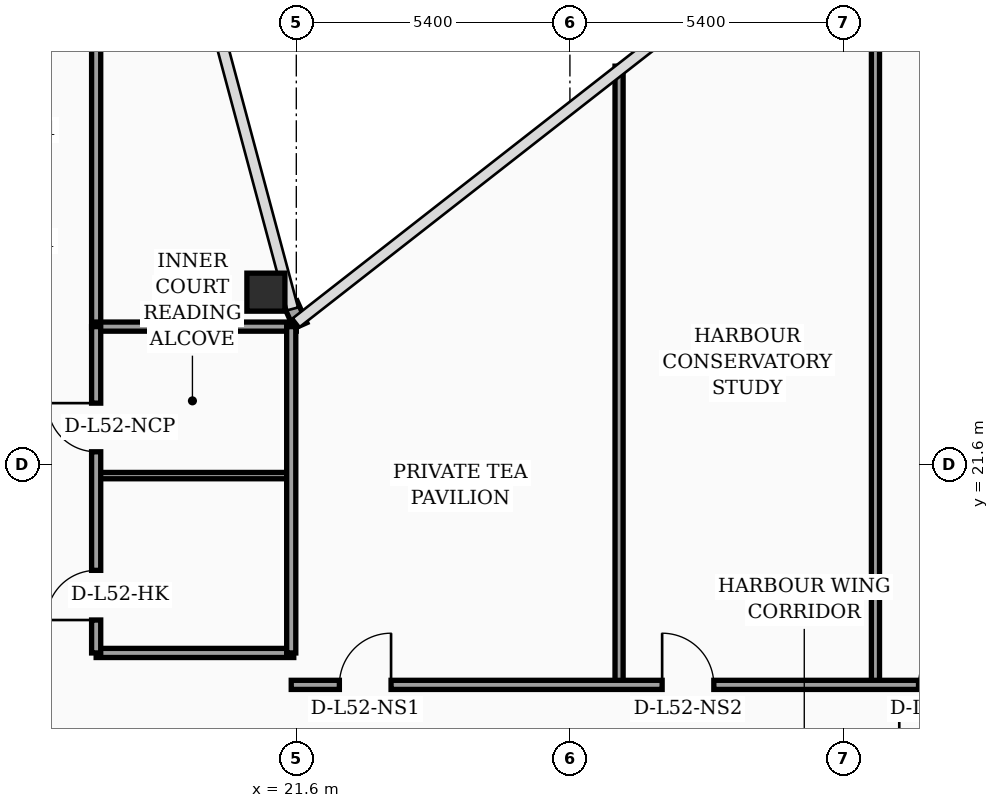
"""IFC4 building model, lengths in metres.
Left out: names, types, materials, properties, quantities, classifications, styles, units other than length and angle.
Written with IfcOpenShell. Run it as: python <this file> out.ifc"""

import sys

from ifc_helpers import new_model, si_unit, direction, frame, frame_2d, origin, origin_2d, place, context, subcontext, project, spatial, rectangle, hollow_rectangle, extrude, element, fill, save


model = new_model("IFC4")
c1 = context("Model", 3, precision=1e-05, world=origin(), true_north=direction((0.0, 1.0)))
c2 = subcontext(c1, "Body", "Model", "MODEL_VIEW")
j1 = project(units=[si_unit("LENGTHUNIT", "METRE"), si_unit("PLANEANGLEUNIT", "RADIAN")], contexts=[c1])
p1 = place(None, origin())
s1 = spatial("IfcSite", under=j1, at=p1, CompositionType="ELEMENT")
p2 = place(p1, origin())
s2 = spatial("IfcBuilding", under=s1, at=p2, CompositionType="ELEMENT")
p3 = place(p2, frame((0.0, 0.0, 211.0)))
s3 = spatial("IfcBuildingStorey", under=s2, at=p3, CompositionType="ELEMENT", Elevation=211.0)
p4 = place(p3, frame((21.0, 25.0, 0.0), z_axis=(0.0, 0.0, 1.0), x_axis=(1.0, 0.0, 0.0)))
e1 = element("IfcColumn", 1, at=p4, inside=s3, PredefinedType="COLUMN", context=c2, shape_type="SweptSolid", body=[
    extrude(hollow_rectangle(XDim=0.75, YDim=0.75, WallThickness=0.032, at=origin_2d()), origin(), (0.0, 0.0, 1.0), 3.56),
])
p5 = place(p3, frame((21.68, 24.34, 0.0), z_axis=(0.0, 0.0, 1.0), x_axis=(-0.40758134973, 0.913168901875, 0.0)))
e2 = element("IfcWall", 2, at=p5, inside=s3, PredefinedType="SOLIDWALL", context=c2, shape_type="SweptSolid", body=[
    extrude(rectangle(XDim=0.471, YDim=0.28, at=frame_2d((0.235, 0.0))), origin(), (0.0, 0.0, 1.0), 3.56),
])
p6 = place(p3, frame((17.65, 24.3, 0.0), z_axis=(0.0, 0.0, 1.0), x_axis=(0.0, 1.0, 0.0)))
e3 = element("IfcWall", 3, at=p6, inside=s3, PredefinedType="PARTITIONING", context=c2, shape_type="SweptSolid", body=[
    extrude(rectangle(XDim=18.15, YDim=0.18, at=frame_2d((9.075, 0.0))), origin(), (0.0, 0.0, 1.0), 2.94),
])
p7 = place(p3, frame((17.65, 17.88, 0.0), z_axis=(0.0, 0.0, 1.0), x_axis=(1.0, 0.0, 0.0)))
e4 = element("IfcWall", 4, at=p7, inside=s3, PredefinedType="PARTITIONING", context=c2, shape_type="SweptSolid", body=[
    extrude(rectangle(XDim=3.9, YDim=0.18, at=frame_2d((1.95, 0.0))), origin(), (0.0, 0.0, 1.0), 3.56),
])
p8 = place(p3, frame((17.65, 21.38, 0.0), z_axis=(0.0, 0.0, 1.0), x_axis=(1.0, 0.0, 0.0)))
e5 = element("IfcWall", 5, at=p8, inside=s3, PredefinedType="PARTITIONING", context=c2, shape_type="SweptSolid", body=[
    extrude(rectangle(XDim=3.9, YDim=0.125, at=frame_2d((1.95, 0.0))), origin(), (0.0, 0.0, 1.0), 3.56),
])
p9 = place(p3, frame((17.65, 24.32, 0.0), z_axis=(0.0, 0.0, 1.0), x_axis=(1.0, 0.0, 0.0)))
e6 = element("IfcWall", 6, at=p9, inside=s3, PredefinedType="PARTITIONING", context=c2, shape_type="SweptSolid", body=[
    extrude(rectangle(XDim=3.95, YDim=0.18, at=frame_2d((1.975, 0.0))), origin(), (0.0, 0.0, 1.0), 3.56),
])
p10 = place(p3, frame((21.5, 17.88, 0.0), z_axis=(0.0, 0.0, 1.0), x_axis=(0.0, 1.0, 0.0)))
e7 = element("IfcWall", 7, at=p10, inside=s3, PredefinedType="PARTITIONING", context=c2, shape_type="SweptSolid", body=[
    extrude(rectangle(XDim=6.44, YDim=0.18, at=frame_2d((3.22, 0.0))), origin(), (0.0, 0.0, 1.0), 3.56),
])
p11 = place(p3, frame((17.65, 17.88, 0.0), z_axis=(0.0, 0.0, 1.0), x_axis=(0.0, 1.0, 0.0)))
e8 = element("IfcWall", 8, at=p11, inside=s3, PredefinedType="PARTITIONING", context=c2, shape_type="SweptSolid", body=[
    extrude(rectangle(XDim=6.44, YDim=0.18, at=frame_2d((3.22, 0.0))), origin(), (0.0, 0.0, 1.0), 3.56),
])
p12 = place(p11, frame((0.65, 0.0, 0.0)))
e9 = element("IfcOpeningElement", 9, at=p12, cuts=e8, PredefinedType="OPENING", context=c2, shape_type="SweptSolid", body=[
    extrude(rectangle(XDim=0.98, YDim=2.15, at=frame_2d((0.49, 1.075))), frame((0.0, 0.1, 0.0), z_axis=(0.0, -1.0, 0.0), x_axis=(1.0, 0.0, 0.0)), (0.0, 0.0, 1.0), 0.2),
])
p13 = place(p11, frame((3.97, 0.0, 0.0)))
e10 = element("IfcOpeningElement", 10, at=p13, cuts=e8, PredefinedType="OPENING", context=c2, shape_type="SweptSolid", body=[
    extrude(rectangle(XDim=0.96, YDim=2.2, at=frame_2d((0.48, 1.1))), frame((0.0, 0.1, 0.0), z_axis=(0.0, -1.0, 0.0), x_axis=(1.0, 0.0, 0.0)), (0.0, 0.0, 1.0), 0.2),
])
p14 = place(p3, frame((27.97, 17.25, 0.0), z_axis=(0.0, 0.0, 1.0), x_axis=(0.0, 1.0, 0.0)))
e11 = element("IfcWall", 11, at=p14, inside=s3, PredefinedType="PARTITIONING", context=c2, shape_type="SweptSolid", body=[
    extrude(rectangle(XDim=12.21, YDim=0.16, at=frame_2d((6.105, 0.0))), origin(), (0.0, 0.0, 1.0), 2.94),
])
p15 = place(p3, frame((33.03, 17.25, 0.0), z_axis=(0.0, 0.0, 1.0), x_axis=(0.0, 1.0, 0.0)))
e12 = element("IfcWall", 12, at=p15, inside=s3, PredefinedType="PARTITIONING", context=c2, shape_type="SweptSolid", body=[
    extrude(rectangle(XDim=16.16, YDim=0.16, at=frame_2d((8.08, 0.0))), origin(), (0.0, 0.0, 1.0), 2.94),
])
p16 = place(p3, frame((21.5, 17.25, 0.0), z_axis=(0.0, 0.0, 1.0), x_axis=(1.0, 0.0, 0.0)))
e13 = element("IfcWall", 13, at=p16, inside=s3, PredefinedType="PARTITIONING", context=c2, shape_type="SweptSolid", body=[
    extrude(rectangle(XDim=17.25, YDim=0.18, at=frame_2d((8.625, 0.0))), origin(), (0.0, 0.0, 1.0), 2.94),
])
p17 = place(p16, frame((0.95, 0.0, 0.0)))
e14 = element("IfcOpeningElement", 14, at=p17, cuts=e13, PredefinedType="OPENING", context=c2, shape_type="SweptSolid", body=[
    extrude(rectangle(XDim=1.02, YDim=2.2, at=frame_2d((0.51, 1.1))), frame((0.0, 0.1, 0.0), z_axis=(0.0, -1.0, 0.0), x_axis=(1.0, 0.0, 0.0)), (0.0, 0.0, 1.0), 0.2),
])
p18 = place(p16, frame((7.32, 0.0, 0.0)))
e15 = element("IfcOpeningElement", 15, at=p18, cuts=e13, PredefinedType="OPENING", context=c2, shape_type="SweptSolid", body=[
    extrude(rectangle(XDim=1.02, YDim=2.2, at=frame_2d((0.51, 1.1))), frame((0.0, 0.1, 0.0), z_axis=(0.0, -1.0, 0.0), x_axis=(1.0, 0.0, 0.0)), (0.0, 0.0, 1.0), 0.2),
])
p19 = place(p16, frame((12.38, 0.0, 0.0)))
e16 = element("IfcOpeningElement", 16, at=p19, cuts=e13, PredefinedType="OPENING", context=c2, shape_type="SweptSolid", body=[
    extrude(rectangle(XDim=1.02, YDim=2.2, at=frame_2d((0.51, 1.1))), frame((0.0, 0.1, 0.0), z_axis=(0.0, -1.0, 0.0), x_axis=(1.0, 0.0, 0.0)), (0.0, 0.0, 1.0), 0.2),
])
p20 = place(p12, origin())
e17 = element("IfcDoor", 17, at=p20, inside=s3, OperationType="SINGLE_SWING_LEFT", PredefinedType="DOOR", context=c2, shape_type="SweptSolid", body=[
    extrude(rectangle(XDim=0.98, YDim=2.15, at=frame_2d((0.49, 1.075))), frame((0.0, 0.025, 0.0), z_axis=(0.0, -1.0, 0.0), x_axis=(1.0, 0.0, 0.0)), (0.0, 0.0, 1.0), 0.05),
])
fill(e9, e17)
p21 = place(p13, origin())
e18 = element("IfcDoor", 18, at=p21, inside=s3, OperationType="SINGLE_SWING_RIGHT", PredefinedType="DOOR", context=c2, shape_type="SweptSolid", body=[
    extrude(rectangle(XDim=0.96, YDim=2.2, at=frame_2d((0.48, 1.1))), frame((0.0, 0.025, 0.0), z_axis=(0.0, -1.0, 0.0), x_axis=(1.0, 0.0, 0.0)), (0.0, 0.0, 1.0), 0.05),
])
fill(e10, e18)
p22 = place(p17, origin())
e19 = element("IfcDoor", 19, at=p22, inside=s3, OperationType="SINGLE_SWING_RIGHT", PredefinedType="DOOR", context=c2, shape_type="SweptSolid", body=[
    extrude(rectangle(XDim=1.02, YDim=2.2, at=frame_2d((0.51, 1.1))), frame((0.0, 0.025, 0.0), z_axis=(0.0, -1.0, 0.0), x_axis=(1.0, 0.0, 0.0)), (0.0, 0.0, 1.0), 0.05),
])
fill(e14, e19)
p23 = place(p18, origin())
e20 = element("IfcDoor", 20, at=p23, inside=s3, OperationType="SINGLE_SWING_LEFT", PredefinedType="DOOR", context=c2, shape_type="SweptSolid", body=[
    extrude(rectangle(XDim=1.02, YDim=2.2, at=frame_2d((0.51, 1.1))), frame((0.0, 0.025, 0.0), z_axis=(0.0, -1.0, 0.0), x_axis=(1.0, 0.0, 0.0)), (0.0, 0.0, 1.0), 0.05),
])
fill(e15, e20)
p24 = place(p19, origin())
e21 = element("IfcDoor", 21, at=p24, inside=s3, OperationType="SINGLE_SWING_RIGHT", PredefinedType="DOOR", context=c2, shape_type="SweptSolid", body=[
    extrude(rectangle(XDim=1.02, YDim=2.2, at=frame_2d((0.51, 1.1))), frame((0.0, 0.025, 0.0), z_axis=(0.0, -1.0, 0.0), x_axis=(1.0, 0.0, 0.0)), (0.0, 0.0, 1.0), 0.05),
])
fill(e16, e21)
save(model, sys.argv[1])
